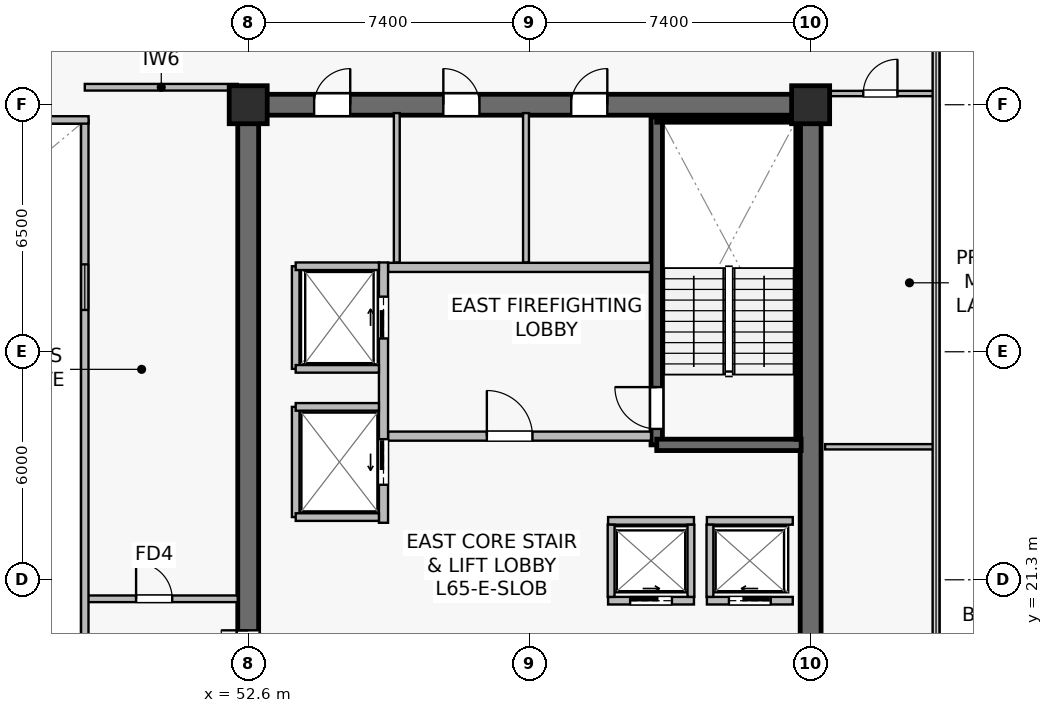
"""IFC4 building model, lengths in metres.
Left out: names, types, materials, properties, quantities, classifications, styles, units other than length and angle.
Written with IfcOpenShell. Run it as: python <this file> out.ifc"""

import sys

from ifc_helpers import new_model, si_unit, direction, frame, frame_2d, origin, origin_2d, place, context, subcontext, project, spatial, rectangle, extrude, source, transform, mapped, element, fill, save


model = new_model("IFC4")
c1 = context("Model", 3, precision=1e-05, world=origin(), true_north=direction((0.0, 1.0)))
c2 = subcontext(c1, "Body", "Model", "MODEL_VIEW")
j1 = project(units=[si_unit("LENGTHUNIT", "METRE"), si_unit("PLANEANGLEUNIT", "RADIAN")], contexts=[c1])
p1 = place(None, origin())
s1 = spatial("IfcSite", under=j1, at=p1, CompositionType="ELEMENT")
p2 = place(p1, origin())
s2 = spatial("IfcBuilding", under=s1, at=p2, CompositionType="ELEMENT")
p3 = place(p2, frame((0.0, 0.0, 271.1)))
s3 = spatial("IfcBuildingStorey", under=s2, at=p3, CompositionType="ELEMENT", Elevation=271.1)
p4 = place(p3, frame((52.325, 33.8, 0.0), z_axis=(0.0, 0.0, 1.0), x_axis=(1.0, 0.0, 0.0)))
e1 = element("IfcWall", 1, at=p4, inside=s3, PredefinedType="SHEAR", context=c2, shape_type="SweptSolid", body=[
    extrude(rectangle(XDim=15.35, YDim=0.55, at=frame_2d((7.675, 0.0))), origin(), (0.0, 0.0, 1.0), 3.8),
])
p5 = place(p4, frame((8.775, 0.0, 0.0)))
e2 = element("IfcOpeningElement", 2, at=p5, cuts=e1, PredefinedType="OPENING", context=c2, shape_type="SweptSolid", body=[
    extrude(rectangle(XDim=0.95, YDim=2.15, at=frame_2d((0.475, 1.075))), frame((0.0, 0.285, 0.0), z_axis=(0.0, -1.0, 0.0), x_axis=(1.0, 0.0, 0.0)), (0.0, 0.0, 1.0), 0.57),
])
p6 = place(p4, frame((5.41, 0.0, 0.0)))
e3 = element("IfcOpeningElement", 3, at=p6, cuts=e1, PredefinedType="OPENING", context=c2, shape_type="SweptSolid", body=[
    extrude(rectangle(XDim=0.95, YDim=2.15, at=frame_2d((0.475, 1.075))), frame((0.0, 0.285, 0.0), z_axis=(0.0, -1.0, 0.0), x_axis=(1.0, 0.0, 0.0)), (0.0, 0.0, 1.0), 0.57),
])
p7 = place(p4, frame((2.01, 0.0, 0.0)))
e4 = element("IfcOpeningElement", 4, at=p7, cuts=e1, PredefinedType="OPENING", context=c2, shape_type="SweptSolid", body=[
    extrude(rectangle(XDim=0.95, YDim=2.15, at=frame_2d((0.475, 1.075))), frame((0.0, 0.285, 0.0), z_axis=(0.0, -1.0, 0.0), x_axis=(1.0, 0.0, 0.0)), (0.0, 0.0, 1.0), 0.57),
])
p8 = place(p3, frame((52.6, 15.075, 0.0), z_axis=(0.0, 0.0, 1.0), x_axis=(0.0, 1.0, 0.0)))
e5 = element("IfcWall", 5, at=p8, inside=s3, PredefinedType="SHEAR", context=c2, shape_type="SweptSolid", body=[
    extrude(rectangle(XDim=18.45, YDim=0.55, at=frame_2d((9.225, 0.0))), origin(), (0.0, 0.0, 1.0), 3.8),
])
p9 = place(p8, frame((3.475, 0.0, 0.0)))
e6 = element("IfcOpeningElement", 6, at=p9, cuts=e5, PredefinedType="OPENING", context=c2, shape_type="SweptSolid", body=[
    extrude(rectangle(XDim=1.42, YDim=2.2, at=frame_2d((0.71, 1.1))), frame((0.0, 0.285, 0.0), z_axis=(0.0, -1.0, 0.0), x_axis=(1.0, 0.0, 0.0)), (0.0, 0.0, 1.0), 0.57),
])
p10 = place(p3, frame((67.4, 15.075, 0.0), z_axis=(0.0, 0.0, 1.0), x_axis=(0.0, 1.0, 0.0)))
e7 = element("IfcWall", 7, at=p10, inside=s3, PredefinedType="SHEAR", context=c2, shape_type="SweptSolid", body=[
    extrude(rectangle(XDim=18.45, YDim=0.55, at=frame_2d((9.225, 0.0))), origin(), (0.0, 0.0, 1.0), 3.8),
])
p11 = place(p3, frame((63.35, 24.85, 0.0), z_axis=(0.0, 0.0, 1.0), x_axis=(0.0, 1.0, 0.0)))
e8 = element("IfcWall", 8, at=p11, inside=s3, PredefinedType="SHEAR", context=c2, shape_type="SweptSolid", body=[
    extrude(rectangle(XDim=8.63, YDim=0.3, at=frame_2d((4.315, 0.0))), origin(), (0.0, 0.0, 1.0), 3.8),
])
p12 = place(p11, frame((0.42, 0.0, 0.0)))
e9 = element("IfcOpeningElement", 9, at=p12, cuts=e8, PredefinedType="OPENING", context=c2, shape_type="SweptSolid", body=[
    extrude(rectangle(XDim=1.1, YDim=2.15, at=frame_2d((0.55, 1.075))), frame((0.0, 0.16, 0.0), z_axis=(0.0, -1.0, 0.0), x_axis=(1.0, 0.0, 0.0)), (0.0, 0.0, 1.0), 0.32),
])
p13 = place(p3, frame((63.35, 24.85, 0.0), z_axis=(0.0, 0.0, 1.0), x_axis=(1.0, 0.0, 0.0)))
e10 = element("IfcWall", 10, at=p13, inside=s3, PredefinedType="SHEAR", context=c2, shape_type="SweptSolid", body=[
    extrude(rectangle(XDim=3.8, YDim=0.3, at=frame_2d((1.9, 0.0))), origin(), (0.0, 0.0, 1.0), 3.8),
])
p14 = place(p3, frame((63.35, 33.4, 0.0), z_axis=(0.0, 0.0, 1.0), x_axis=(1.0, 0.0, 0.0)))
e11 = element("IfcWall", 11, at=p14, inside=s3, PredefinedType="SOLIDWALL", context=c2, shape_type="SweptSolid", body=[
    extrude(rectangle(XDim=3.72, YDim=0.12, at=frame_2d((1.86, 0.0))), origin(), (0.0, 0.0, 1.0), 3.8),
])
p15 = place(p3, frame((67.07, 25.0, 0.0), z_axis=(0.0, 0.0, 1.0), x_axis=(0.0, 1.0, 0.0)))
e12 = element("IfcWall", 12, at=p15, inside=s3, PredefinedType="SOLIDWALL", context=c2, shape_type="SweptSolid", body=[
    extrude(rectangle(XDim=8.32, YDim=0.12, at=frame_2d((4.16, 0.0))), origin(), (0.0, 0.0, 1.0), 3.8),
])
m1 = source(origin(), c2, "Body", "SweptSolid", [
    extrude(rectangle(XDim=1.0, YDim=1.0, at=origin_2d()), origin(), (0.0, 0.0, 1.0), 4.1),
])
for number, where, z_axis, x_axis in (
    (13, (52.6, 33.8, 0.0), (0.0, 0.0, 1.0), (1.0, 0.0, 0.0)),
    (14, (67.4, 33.8, 0.0), (0.0, 0.0, 1.0), (1.0, 0.0, 0.0)),
):
    element("IfcColumn", number, at=place(p3, frame(where, z_axis=z_axis, x_axis=x_axis)), inside=s3, PredefinedType="COLUMN", context=c2, shape_type="MappedRepresentation", body=[
        mapped(m1, transform((0.0, 0.0, 0.0), scale=1.0)),
    ])
p16 = place(p3, frame((56.28, 25.08, 0.0), z_axis=(0.0, 0.0, 1.0), x_axis=(1.0, 0.0, 0.0)))
e15 = element("IfcWall", 15, at=p16, inside=s3, PredefinedType="SOLIDWALL", context=c2, shape_type="SweptSolid", body=[
    extrude(rectangle(XDim=6.92, YDim=0.24, at=frame_2d((3.46, 0.0))), origin(), (0.0, 0.0, 1.0), 3.197),
])
p17 = place(p16, frame((2.6, 0.0, 0.0)))
e16 = element("IfcOpeningElement", 16, at=p17, cuts=e15, PredefinedType="OPENING", context=c2, shape_type="SweptSolid", body=[
    extrude(rectangle(XDim=1.2, YDim=2.16, at=frame_2d((0.6, 1.08))), frame((0.0, 0.13, 0.0), z_axis=(0.0, -1.0, 0.0), x_axis=(1.0, 0.0, 0.0)), (0.0, 0.0, 1.0), 0.26),
])
p18 = place(p3, frame((56.28, 29.52, 0.0), z_axis=(0.0, 0.0, 1.0), x_axis=(1.0, 0.0, 0.0)))
e17 = element("IfcWall", 17, at=p18, inside=s3, PredefinedType="SOLIDWALL", context=c2, shape_type="SweptSolid", body=[
    extrude(rectangle(XDim=6.92, YDim=0.24, at=frame_2d((3.46, 0.0))), origin(), (0.0, 0.0, 1.0), 3.197),
])
p19 = place(p3, frame((56.16, 22.8, 0.0), z_axis=(0.0, 0.0, 1.0), x_axis=(0.0, 1.0, 0.0)))
e18 = element("IfcWall", 18, at=p19, inside=s3, PredefinedType="SOLIDWALL", context=c2, shape_type="SweptSolid", body=[
    extrude(rectangle(XDim=6.85, YDim=0.24, at=frame_2d((3.425, 0.0))), origin(), (0.0, 0.0, 1.0), 2.935),
])
p20 = place(p19, frame((4.85, 0.0, 0.0)))
e19 = element("IfcOpeningElement", 19, at=p20, cuts=e18, PredefinedType="OPENING", context=c2, shape_type="SweptSolid", body=[
    extrude(rectangle(XDim=1.1, YDim=2.22, at=frame_2d((0.55, 1.11))), frame((0.0, 0.13, 0.0), z_axis=(0.0, -1.0, 0.0), x_axis=(1.0, 0.0, 0.0)), (0.0, 0.0, 1.0), 0.26),
])
p21 = place(p19, frame((1.0, 0.0, 0.0)))
e20 = element("IfcOpeningElement", 20, at=p21, cuts=e18, PredefinedType="OPENING", context=c2, shape_type="SweptSolid", body=[
    extrude(rectangle(XDim=1.2, YDim=2.22, at=frame_2d((0.6, 1.11))), frame((0.0, 0.13, 0.0), z_axis=(0.0, -1.0, 0.0), x_axis=(1.0, 0.0, 0.0)), (0.0, 0.0, 1.0), 0.26),
])
p22 = place(p3, frame((64.67, 20.75, 0.0), z_axis=(0.0, 0.0, 1.0), x_axis=(1.0, 0.0, 0.0)))
e21 = element("IfcWall", 21, at=p22, inside=s3, PredefinedType="SOLIDWALL", context=c2, shape_type="SweptSolid", body=[
    extrude(rectangle(XDim=2.26, YDim=0.2, at=frame_2d((1.13, 0.0))), origin(), (0.0, 0.0, 1.0), 3.8),
])
p23 = place(p22, frame((0.58, 0.0, 0.0)))
e22 = element("IfcOpeningElement", 22, at=p23, cuts=e21, PredefinedType="OPENING", context=c2, shape_type="SweptSolid", body=[
    extrude(rectangle(XDim=1.1, YDim=2.22, at=frame_2d((0.55, 1.11))), frame((0.0, 0.11, 0.0), z_axis=(0.0, -1.0, 0.0), x_axis=(1.0, 0.0, 0.0)), (0.0, 0.0, 1.0), 0.22),
])
p24 = place(p3, frame((64.67, 22.85, 0.0), z_axis=(0.0, 0.0, 1.0), x_axis=(1.0, 0.0, 0.0)))
e23 = element("IfcWall", 23, at=p24, inside=s3, PredefinedType="SOLIDWALL", context=c2, shape_type="SweptSolid", body=[
    extrude(rectangle(XDim=2.26, YDim=0.2, at=frame_2d((1.13, 0.0))), origin(), (0.0, 0.0, 1.0), 3.8),
])
p25 = place(p3, frame((64.75, 20.85, 0.0), z_axis=(0.0, 0.0, 1.0), x_axis=(0.0, 1.0, 0.0)))
e24 = element("IfcWall", 24, at=p25, inside=s3, PredefinedType="SOLIDWALL", context=c2, shape_type="SweptSolid", body=[
    extrude(rectangle(XDim=1.9, YDim=0.18, at=frame_2d((0.95, 0.0))), origin(), (0.0, 0.0, 1.0), 3.8),
])
p26 = place(p3, frame((62.07, 20.75, 0.0), z_axis=(0.0, 0.0, 1.0), x_axis=(1.0, 0.0, 0.0)))
e25 = element("IfcWall", 25, at=p26, inside=s3, PredefinedType="SOLIDWALL", context=c2, shape_type="SweptSolid", body=[
    extrude(rectangle(XDim=2.26, YDim=0.2, at=frame_2d((1.13, 0.0))), origin(), (0.0, 0.0, 1.0), 3.8),
])
p27 = place(p26, frame((0.58, 0.0, 0.0)))
e26 = element("IfcOpeningElement", 26, at=p27, cuts=e25, PredefinedType="OPENING", context=c2, shape_type="SweptSolid", body=[
    extrude(rectangle(XDim=1.1, YDim=2.22, at=frame_2d((0.55, 1.11))), frame((0.0, 0.11, 0.0), z_axis=(0.0, -1.0, 0.0), x_axis=(1.0, 0.0, 0.0)), (0.0, 0.0, 1.0), 0.22),
])
p28 = place(p3, frame((62.07, 22.85, 0.0), z_axis=(0.0, 0.0, 1.0), x_axis=(1.0, 0.0, 0.0)))
e27 = element("IfcWall", 27, at=p28, inside=s3, PredefinedType="SOLIDWALL", context=c2, shape_type="SweptSolid", body=[
    extrude(rectangle(XDim=2.26, YDim=0.2, at=frame_2d((1.13, 0.0))), origin(), (0.0, 0.0, 1.0), 3.8),
])
for number, where, z_axis, x_axis in (
    (28, (62.15, 20.85, 0.0), (0.0, 0.0, 1.0), (0.0, 1.0, 0.0)),
    (29, (64.25, 20.85, 0.0), (0.0, 0.0, 1.0), (0.0, 1.0, 0.0)),
):
    element("IfcWall", number, at=place(p3, frame(where, z_axis=z_axis, x_axis=x_axis)), inside=s3, PredefinedType="SOLIDWALL", context=c2, shape_type="SweptSolid", body=[
        extrude(rectangle(XDim=1.9, YDim=0.18, at=frame_2d((0.95, 0.0))), origin(), (0.0, 0.0, 1.0), 3.8),
    ])
p29 = place(p3, frame((53.85, 26.85, 0.0), z_axis=(0.0, 0.0, 1.0), x_axis=(0.0, 1.0, 0.0)))
e30 = element("IfcWall", 30, at=p29, inside=s3, PredefinedType="SOLIDWALL", context=c2, shape_type="SweptSolid", body=[
    extrude(rectangle(XDim=2.7, YDim=0.2, at=frame_2d((1.35, 0.0))), origin(), (0.0, 0.0, 1.0), 3.8),
])
p30 = place(p3, frame((53.85, 29.55, 0.0), z_axis=(0.0, 0.0, 1.0), x_axis=(1.0, 0.0, 0.0)))
e31 = element("IfcWall", 31, at=p30, inside=s3, PredefinedType="SOLIDWALL", context=c2, shape_type="SweptSolid", body=[
    extrude(rectangle(XDim=2.19, YDim=0.2, at=frame_2d((1.095, 0.0))), origin(), (0.0, 0.0, 1.0), 3.8),
])
p31 = place(p3, frame((53.85, 26.85, 0.0), z_axis=(0.0, 0.0, 1.0), x_axis=(1.0, 0.0, 0.0)))
e32 = element("IfcWall", 32, at=p31, inside=s3, PredefinedType="SOLIDWALL", context=c2, shape_type="SweptSolid", body=[
    extrude(rectangle(XDim=2.19, YDim=0.2, at=frame_2d((1.095, 0.0))), origin(), (0.0, 0.0, 1.0), 3.197),
])
p32 = place(p3, frame((53.85, 22.95, 0.0), z_axis=(0.0, 0.0, 1.0), x_axis=(0.0, 1.0, 0.0)))
e33 = element("IfcWall", 33, at=p32, inside=s3, PredefinedType="SOLIDWALL", context=c2, shape_type="SweptSolid", body=[
    extrude(rectangle(XDim=2.9, YDim=0.2, at=frame_2d((1.45, 0.0))), origin(), (0.0, 0.0, 1.0), 2.935),
])
for number, where, z_axis, x_axis in (
    (34, (53.85, 25.85, 0.0), (0.0, 0.0, 1.0), (1.0, 0.0, 0.0)),
    (35, (53.85, 22.95, 0.0), (0.0, 0.0, 1.0), (1.0, 0.0, 0.0)),
):
    element("IfcWall", number, at=place(p3, frame(where, z_axis=z_axis, x_axis=x_axis)), inside=s3, PredefinedType="SOLIDWALL", context=c2, shape_type="SweptSolid", body=[
        extrude(rectangle(XDim=2.19, YDim=0.2, at=frame_2d((1.095, 0.0))), origin(), (0.0, 0.0, 1.0), 3.8),
    ])
p33 = place(p3, frame((59.91, 29.65, 0.0), z_axis=(0.0, 0.0, 1.0), x_axis=(0.0, 1.0, 0.0)))
e36 = element("IfcWall", 36, at=p33, inside=s3, PredefinedType="PLUMBINGWALL", context=c2, shape_type="SweptSolid", body=[
    extrude(rectangle(XDim=3.93, YDim=0.155, at=frame_2d((1.965, 0.0))), origin(), (0.0, 0.0, 1.0), 3.197),
])
p34 = place(p3, frame((56.51, 29.65, 0.0), z_axis=(0.0, 0.0, 1.0), x_axis=(0.0, 1.0, 0.0)))
e37 = element("IfcWall", 37, at=p34, inside=s3, PredefinedType="PLUMBINGWALL", context=c2, shape_type="SweptSolid", body=[
    extrude(rectangle(XDim=3.93, YDim=0.155, at=frame_2d((1.965, 0.0))), origin(), (0.0, 0.0, 1.0), 3.8),
])
p35 = place(p3, frame((48.3, 34.26, 0.0), z_axis=(0.0, 0.0, 1.0), x_axis=(1.0, 0.0, 0.0)))
e38 = element("IfcWall", 38, at=p35, inside=s3, PredefinedType="PARTITIONING", context=c2, shape_type="SweptSolid", body=[
    extrude(rectangle(XDim=4.025, YDim=0.175, at=frame_2d((2.012, 0.0))), origin(), (0.0, 0.0, 1.0), 3.535),
])
p36 = place(p3, frame((48.3, 20.8, 0.0), z_axis=(0.0, 0.0, 1.0), x_axis=(1.0, 0.0, 0.0)))
e39 = element("IfcWall", 39, at=p36, inside=s3, PredefinedType="PARTITIONING", context=c2, shape_type="SweptSolid", body=[
    extrude(rectangle(XDim=4.025, YDim=0.175, at=frame_2d((2.012, 0.0))), origin(), (0.0, 0.0, 1.0), 3.8),
])
p37 = place(p36, frame((1.35, 0.0, 0.0)))
e40 = element("IfcOpeningElement", 40, at=p37, cuts=e39, PredefinedType="OPENING", context=c2, shape_type="SweptSolid", body=[
    extrude(rectangle(XDim=0.95, YDim=2.15, at=frame_2d((0.475, 1.075))), frame((0.0, 0.098, 0.0), z_axis=(0.0, -1.0, 0.0), x_axis=(1.0, 0.0, 0.0)), (0.0, 0.0, 1.0), 0.195),
])
p38 = place(p3, frame((48.3, 15.2, 0.0), z_axis=(0.0, 0.0, 1.0), x_axis=(0.0, 1.0, 0.0)))
e41 = element("IfcWall", 41, at=p38, inside=s3, PredefinedType="SOLIDWALL", context=c2, shape_type="SweptSolid", body=[
    extrude(rectangle(XDim=18.2, YDim=0.195, at=frame_2d((9.1, 0.0))), origin(), (0.0, 0.0, 1.0), 3.8),
])
p39 = place(p38, frame((1.8, 0.0, 0.9)))
e42 = element("IfcOpeningElement", 42, at=p39, cuts=e41, PredefinedType="OPENING", context=c2, shape_type="SweptSolid", body=[
    extrude(rectangle(XDim=1.2, YDim=1.35, at=frame_2d((0.6, 0.675))), frame((0.0, 0.107, 0.0), z_axis=(0.0, -1.0, 0.0), x_axis=(1.0, 0.0, 0.0)), (0.0, 0.0, 1.0), 0.215),
])
p40 = place(p38, frame((13.2, 0.0, 0.9)))
e43 = element("IfcOpeningElement", 43, at=p40, cuts=e41, PredefinedType="OPENING", context=c2, shape_type="SweptSolid", body=[
    extrude(rectangle(XDim=1.2, YDim=1.35, at=frame_2d((0.6, 0.675))), frame((0.0, 0.107, 0.0), z_axis=(0.0, -1.0, 0.0), x_axis=(1.0, 0.0, 0.0)), (0.0, 0.0, 1.0), 0.215),
])
p41 = place(p3, frame((26.4, 33.4, 0.0), z_axis=(0.0, 0.0, 1.0), x_axis=(1.0, 0.0, 0.0)))
e44 = element("IfcWall", 44, at=p41, inside=s3, PredefinedType="SOLIDWALL", context=c2, shape_type="SweptSolid", body=[
    extrude(rectangle(XDim=22.0, YDim=0.195, at=frame_2d((11.0, 0.0))), origin(), (0.0, 0.0, 1.0), 3.8),
])
p42 = place(p3, frame((67.78, 24.8, 0.0), z_axis=(0.0, 0.0, 1.0), x_axis=(1.0, 0.0, 0.0)))
e45 = element("IfcWall", 45, at=p42, inside=s3, PredefinedType="PARTITIONING", context=c2, shape_type="SweptSolid", body=[
    extrude(rectangle(XDim=2.91, YDim=0.14, at=frame_2d((1.455, 0.0))), origin(), (0.0, 0.0, 1.0), 3.8),
])
p43 = place(p3, frame((67.78, 34.095, 0.0), z_axis=(0.0, 0.0, 1.0), x_axis=(1.0, 0.0, 0.0)))
e46 = element("IfcWall", 46, at=p43, inside=s3, PredefinedType="PARTITIONING", context=c2, shape_type="SweptSolid", body=[
    extrude(rectangle(XDim=2.91, YDim=0.14, at=frame_2d((1.455, 0.0))), origin(), (0.0, 0.0, 1.0), 3.8),
])
p44 = place(p43, frame((1.005, 0.0, 0.0)))
e47 = element("IfcOpeningElement", 47, at=p44, cuts=e46, PredefinedType="OPENING", context=c2, shape_type="SweptSolid", body=[
    extrude(rectangle(XDim=0.9, YDim=2.1, at=frame_2d((0.45, 1.05))), frame((0.0, 0.08, 0.0), z_axis=(0.0, -1.0, 0.0), x_axis=(1.0, 0.0, 0.0)), (0.0, 0.0, 1.0), 0.16),
])
m2 = source(origin(), c2, "Body", "SweptSolid", [
    extrude(rectangle(XDim=1.2, YDim=1.35, at=frame_2d((0.6, 0.675))), frame((0.0, 0.03, 0.0), z_axis=(0.0, -1.0, 0.0), x_axis=(1.0, 0.0, 0.0)), (0.0, 0.0, 1.0), 0.06),
])
p45 = place(p40, origin())
e48 = element("IfcWindow", 48, at=p45, inside=s3, PartitioningType="SINGLE_PANEL", PredefinedType="WINDOW", context=c2, shape_type="MappedRepresentation", body=[
    mapped(m2, transform((0.0, 0.0, 0.0), scale=1.0)),
])
fill(e43, e48)
m3 = source(origin(), c2, "Body", "SweptSolid", [
    extrude(rectangle(XDim=1.1, YDim=2.15, at=frame_2d((0.55, 1.075))), frame((0.0, 0.025, 0.0), z_axis=(0.0, -1.0, 0.0), x_axis=(1.0, 0.0, 0.0)), (0.0, 0.0, 1.0), 0.05),
])
p46 = place(p12, origin())
e49 = element("IfcDoor", 49, at=p46, inside=s3, OperationType="SINGLE_SWING_RIGHT", PredefinedType="DOOR", context=c2, shape_type="MappedRepresentation", body=[
    mapped(m3, transform((0.0, 0.0, 0.0), scale=1.0)),
])
fill(e9, e49)
m4 = source(origin(), c2, "Body", "SweptSolid", [
    extrude(rectangle(XDim=1.2, YDim=2.16, at=frame_2d((0.6, 1.08))), frame((0.0, 0.025, 0.0), z_axis=(0.0, -1.0, 0.0), x_axis=(1.0, 0.0, 0.0)), (0.0, 0.0, 1.0), 0.05),
])
p47 = place(p17, origin())
e50 = element("IfcDoor", 50, at=p47, inside=s3, OperationType="SINGLE_SWING_LEFT", PredefinedType="DOOR", context=c2, shape_type="MappedRepresentation", body=[
    mapped(m4, transform((0.0, 0.0, 0.0), scale=1.0)),
])
fill(e16, e50)
m5 = source(origin(), c2, "Body", "SweptSolid", [
    extrude(rectangle(XDim=1.1, YDim=2.22, at=frame_2d((0.55, 1.11))), frame((0.0, 0.025, 0.0), z_axis=(0.0, -1.0, 0.0), x_axis=(1.0, 0.0, 0.0)), (0.0, 0.0, 1.0), 0.05),
])
p48 = place(p23, origin())
e51 = element("IfcDoor", 51, at=p48, inside=s3, OperationType="SLIDING_TO_LEFT", PredefinedType="USERDEFINED", context=c2, shape_type="MappedRepresentation", body=[
    mapped(m5, transform((0.0, 0.0, 0.0), scale=1.0)),
])
fill(e22, e51)
p49 = place(p27, origin())
e52 = element("IfcDoor", 52, at=p49, inside=s3, OperationType="SLIDING_TO_RIGHT", PredefinedType="USERDEFINED", context=c2, shape_type="MappedRepresentation", body=[
    mapped(m5, transform((0.0, 0.0, 0.0), scale=1.0)),
])
fill(e26, e52)
p50 = place(p20, origin())
e53 = element("IfcDoor", 53, at=p50, inside=s3, OperationType="SLIDING_TO_RIGHT", PredefinedType="USERDEFINED", context=c2, shape_type="MappedRepresentation", body=[
    mapped(m5, transform((0.0, 0.0, 0.0), scale=1.0)),
])
fill(e19, e53)
m6 = source(origin(), c2, "Body", "SweptSolid", [
    extrude(rectangle(XDim=1.2, YDim=2.22, at=frame_2d((0.6, 1.11))), frame((0.0, 0.025, 0.0), z_axis=(0.0, -1.0, 0.0), x_axis=(1.0, 0.0, 0.0)), (0.0, 0.0, 1.0), 0.05),
])
p51 = place(p21, origin())
e54 = element("IfcDoor", 54, at=p51, inside=s3, OperationType="SLIDING_TO_LEFT", PredefinedType="USERDEFINED", context=c2, shape_type="MappedRepresentation", body=[
    mapped(m6, transform((0.0, 0.0, 0.0), scale=1.0)),
])
fill(e20, e54)
m7 = source(origin(), c2, "Body", "SweptSolid", [
    extrude(rectangle(XDim=1.42, YDim=2.2, at=frame_2d((0.71, 1.1))), frame((0.0, 0.025, 0.0), z_axis=(0.0, -1.0, 0.0), x_axis=(1.0, 0.0, 0.0)), (0.0, 0.0, 1.0), 0.05),
])
p52 = place(p9, origin())
e55 = element("IfcDoor", 55, at=p52, inside=s3, OperationType="DOUBLE_DOOR_SINGLE_SWING", PredefinedType="DOOR", context=c2, shape_type="MappedRepresentation", body=[
    mapped(m7, transform((0.0, 0.0, 0.0), scale=1.0)),
])
fill(e6, e55)
m8 = source(origin(), c2, "Body", "SweptSolid", [
    extrude(rectangle(XDim=0.95, YDim=2.15, at=frame_2d((0.475, 1.075))), frame((0.0, 0.025, 0.0), z_axis=(0.0, -1.0, 0.0), x_axis=(1.0, 0.0, 0.0)), (0.0, 0.0, 1.0), 0.05),
])
p53 = place(p5, origin())
e56 = element("IfcDoor", 56, at=p53, inside=s3, OperationType="SINGLE_SWING_RIGHT", PredefinedType="DOOR", context=c2, shape_type="MappedRepresentation", body=[
    mapped(m8, transform((0.0, 0.0, 0.0), scale=1.0)),
])
fill(e2, e56)
p54 = place(p6, origin())
e57 = element("IfcDoor", 57, at=p54, inside=s3, OperationType="SINGLE_SWING_LEFT", PredefinedType="DOOR", context=c2, shape_type="MappedRepresentation", body=[
    mapped(m8, transform((0.0, 0.0, 0.0), scale=1.0)),
])
fill(e3, e57)
p55 = place(p7, origin())
e58 = element("IfcDoor", 58, at=p55, inside=s3, OperationType="SINGLE_SWING_RIGHT", PredefinedType="DOOR", context=c2, shape_type="MappedRepresentation", body=[
    mapped(m8, transform((0.0, 0.0, 0.0), scale=1.0)),
])
fill(e4, e58)
p56 = place(p37, origin())
e59 = element("IfcDoor", 59, at=p56, inside=s3, OperationType="SINGLE_SWING_LEFT", PredefinedType="DOOR", context=c2, shape_type="MappedRepresentation", body=[
    mapped(m8, transform((0.0, 0.0, 0.0), scale=1.0)),
])
fill(e40, e59)
m9 = source(origin(), c2, "Body", "SweptSolid", [
    extrude(rectangle(XDim=0.9, YDim=2.1, at=frame_2d((0.45, 1.05))), frame((0.0, 0.025, 0.0), z_axis=(0.0, -1.0, 0.0), x_axis=(1.0, 0.0, 0.0)), (0.0, 0.0, 1.0), 0.05),
])
p57 = place(p44, origin())
e60 = element("IfcDoor", 60, at=p57, inside=s3, OperationType="SINGLE_SWING_RIGHT", PredefinedType="DOOR", context=c2, shape_type="MappedRepresentation", body=[
    mapped(m9, transform((0.0, 0.0, 0.0), scale=1.0)),
])
fill(e47, e60)
save(model, sys.argv[1])
